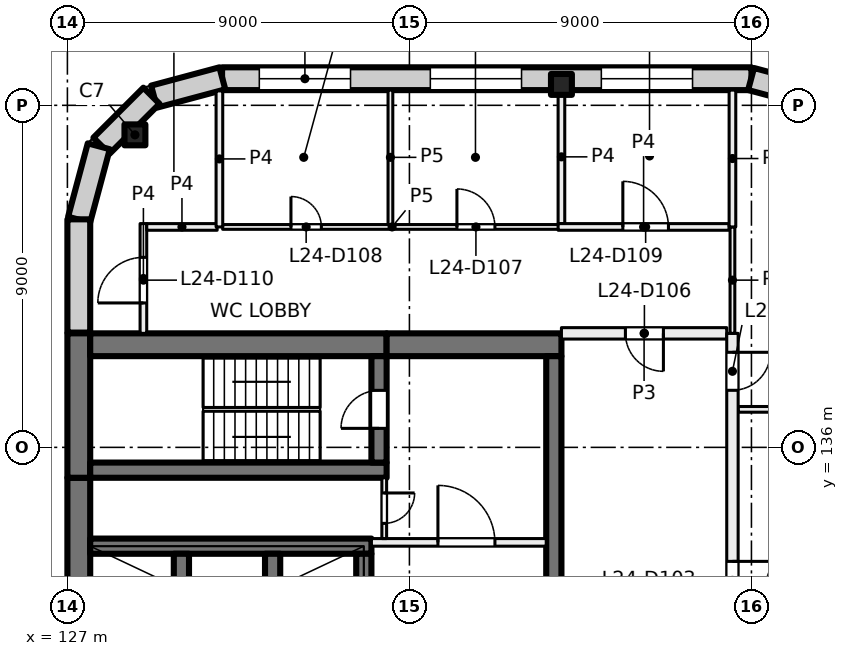
"""IFC4 building model, lengths in metres.
Left out: names, types, materials, properties, quantities, classifications, styles, units other than length and angle.
Written with IfcOpenShell. Run it as: python <this file> out.ifc"""

import sys

from ifc_helpers import new_model, si_unit, direction, frame, frame_2d, origin, origin_2d, place, context, subcontext, project, spatial, rectangle, extrude, element, fill, save


model = new_model("IFC4")
c1 = context("Model", 3, precision=1e-05, world=origin(), true_north=direction((0.0, 1.0)))
c2 = subcontext(c1, "Body", "Model", "MODEL_VIEW")
j1 = project(units=[si_unit("LENGTHUNIT", "METRE"), si_unit("PLANEANGLEUNIT", "RADIAN")], contexts=[c1])
p1 = place(None, origin())
s1 = spatial("IfcSite", under=j1, at=p1, CompositionType="ELEMENT")
p2 = place(p1, origin())
s2 = spatial("IfcBuilding", under=s1, at=p2, CompositionType="ELEMENT")
p3 = place(p2, frame((0.0, 0.0, 105.0)))
s3 = spatial("IfcBuildingStorey", under=s2, at=p3, CompositionType="ELEMENT", Elevation=105.0)
for number, where, z_axis, x_axis in (
    (1, (128.777, 144.223, 0.0), (0.0, 0.0, 1.0), (1.0, 0.0, 0.0)),
    (2, (140.0, 145.55, 0.0), (0.0, 0.0, 1.0), (1.0, 0.0, 0.0)),
):
    element("IfcColumn", number, at=place(p3, frame(where, z_axis=z_axis, x_axis=x_axis)), inside=s3, PredefinedType="COLUMN", context=c2, shape_type="SweptSolid", body=[
        extrude(rectangle(XDim=0.55, YDim=0.55, at=origin_2d()), origin(), (0.0, 0.0, 1.0), 4.0),
    ])
p4 = place(p3, frame((127.3, 120.8, 0.0), z_axis=(0.0, 0.0, 1.0), x_axis=(0.0, 1.0, 0.0)))
e3 = element("IfcWall", 3, at=p4, inside=s3, PredefinedType="SHEAR", context=c2, shape_type="SweptSolid", body=[
    extrude(rectangle(XDim=14.4, YDim=0.6, at=frame_2d((7.2, 0.0))), origin(), (0.0, 0.0, 1.0), 4.0),
])
p5 = place(p3, frame((127.3, 135.2, 0.0), z_axis=(0.0, 0.0, 1.0), x_axis=(0.0, 1.0, 0.0)))
e4 = element("IfcWall", 4, at=p5, inside=s3, PredefinedType="SHEAR", context=c2, shape_type="SweptSolid", body=[
    extrude(rectangle(XDim=3.8, YDim=0.6, at=frame_2d((1.9, 0.0))), origin(), (0.0, 0.0, 1.0), 4.0),
])
p6 = place(p3, frame((127.6, 138.7, 0.0), z_axis=(0.0, 0.0, 1.0), x_axis=(1.0, 0.0, 0.0)))
e5 = element("IfcWall", 5, at=p6, inside=s3, PredefinedType="SHEAR", context=c2, shape_type="SweptSolid", body=[
    extrude(rectangle(XDim=7.8, YDim=0.6, at=frame_2d((3.9, 0.0))), origin(), (0.0, 0.0, 1.0), 4.0),
])
p7 = place(p3, frame((135.4, 138.7, 0.0), z_axis=(0.0, 0.0, 1.0), x_axis=(1.0, 0.0, 0.0)))
e6 = element("IfcWall", 6, at=p7, inside=s3, PredefinedType="SHEAR", context=c2, shape_type="SweptSolid", body=[
    extrude(rectangle(XDim=4.6, YDim=0.6, at=frame_2d((2.3, 0.0))), origin(), (0.0, 0.0, 1.0), 4.0),
])
p8 = place(p3, frame((127.6, 135.4, 0.0), z_axis=(0.0, 0.0, 1.0), x_axis=(1.0, 0.0, 0.0)))
e7 = element("IfcWall", 7, at=p8, inside=s3, PredefinedType="SHEAR", context=c2, shape_type="SweptSolid", body=[
    extrude(rectangle(XDim=7.8, YDim=0.4, at=frame_2d((3.9, 0.0))), origin(), (0.0, 0.0, 1.0), 4.0),
])
p9 = place(p3, frame((135.2, 135.6, 0.0), z_axis=(0.0, 0.0, 1.0), x_axis=(0.0, 1.0, 0.0)))
e8 = element("IfcWall", 8, at=p9, inside=s3, PredefinedType="SHEAR", context=c2, shape_type="SweptSolid", body=[
    extrude(rectangle(XDim=2.8, YDim=0.4, at=frame_2d((1.4, 0.0))), origin(), (0.0, 0.0, 1.0), 4.0),
])
p10 = place(p9, frame((0.9, 0.0, 0.0)))
e9 = element("IfcOpeningElement", 9, at=p10, cuts=e8, PredefinedType="OPENING", context=c2, shape_type="SweptSolid", body=[
    extrude(rectangle(XDim=1.0, YDim=2.1, at=frame_2d((0.5, 1.05))), frame((0.0, 0.21, 0.0), z_axis=(0.0, -1.0, 0.0), x_axis=(1.0, 0.0, 0.0)), (0.0, 0.0, 1.0), 0.42),
])
p11 = place(p3, frame((127.6, 133.4, 0.0), z_axis=(0.0, 0.0, 1.0), x_axis=(1.0, 0.0, 0.0)))
e10 = element("IfcWall", 10, at=p11, inside=s3, PredefinedType="SHEAR", context=c2, shape_type="SweptSolid", body=[
    extrude(rectangle(XDim=7.4, YDim=0.4, at=frame_2d((3.7, 0.0))), origin(), (0.0, 0.0, 1.0), 4.0),
])
for number, where, z_axis, x_axis in (
    (11, (130.0, 130.2, 0.0), (0.0, 0.0, 1.0), (0.0, 1.0, 0.0)),
    (12, (132.4, 130.2, 0.0), (0.0, 0.0, 1.0), (0.0, 1.0, 0.0)),
):
    element("IfcWall", number, at=place(p3, frame(where, z_axis=z_axis, x_axis=x_axis)), inside=s3, PredefinedType="SHEAR", context=c2, shape_type="SweptSolid", body=[
        extrude(rectangle(XDim=3.0, YDim=0.4, at=frame_2d((1.5, 0.0))), origin(), (0.0, 0.0, 1.0), 4.0),
    ])
p12 = place(p3, frame((134.8, 130.2, 0.0), z_axis=(0.0, 0.0, 1.0), x_axis=(0.0, 1.0, 0.0)))
e13 = element("IfcWall", 13, at=p12, inside=s3, PredefinedType="SHEAR", context=c2, shape_type="SweptSolid", body=[
    extrude(rectangle(XDim=3.0, YDim=0.4, at=frame_2d((1.5, 0.0))), origin(), (0.0, 0.0, 1.0), 4.0),
])
p13 = place(p12, frame((0.95, 0.0, 0.0)))
e14 = element("IfcOpeningElement", 14, at=p13, cuts=e13, PredefinedType="OPENING", context=c2, shape_type="SweptSolid", body=[
    extrude(rectangle(XDim=1.1, YDim=2.1, at=frame_2d((0.55, 1.05))), frame((0.0, 0.21, 0.0), z_axis=(0.0, -1.0, 0.0), x_axis=(1.0, 0.0, 0.0)), (0.0, 0.0, 1.0), 0.42),
])
p14 = place(p3, frame((139.8, 129.8, 0.0), z_axis=(0.0, 0.0, 1.0), x_axis=(0.0, 1.0, 0.0)))
e15 = element("IfcWall", 15, at=p14, inside=s3, PredefinedType="SHEAR", context=c2, shape_type="SweptSolid", body=[
    extrude(rectangle(XDim=8.6, YDim=0.4, at=frame_2d((4.3, 0.0))), origin(), (0.0, 0.0, 1.0), 4.0),
])
p15 = place(p3, frame((131.07, 145.7, 0.0), z_axis=(0.0, 0.0, 1.0), x_axis=(1.0, 0.0, 0.0)))
e16 = element("IfcWall", 16, at=p15, inside=s3, PredefinedType="SOLIDWALL", context=c2, shape_type="SweptSolid", body=[
    extrude(rectangle(XDim=13.93, YDim=0.6, at=frame_2d((6.965, 0.0))), origin(), (0.0, 0.0, 1.0), 3.625),
])
p16 = place(p15, frame((0.98, 0.0, 0.9)))
e17 = element("IfcOpeningElement", 17, at=p16, cuts=e16, PredefinedType="OPENING", context=c2, shape_type="SweptSolid", body=[
    extrude(rectangle(XDim=2.4, YDim=2.4, at=frame_2d((1.2, 1.2))), frame((0.0, 0.31, 0.0), z_axis=(0.0, -1.0, 0.0), x_axis=(1.0, 0.0, 0.0)), (0.0, 0.0, 1.0), 0.62),
])
p17 = place(p15, frame((5.48, 0.0, 0.9)))
e18 = element("IfcOpeningElement", 18, at=p17, cuts=e16, PredefinedType="OPENING", context=c2, shape_type="SweptSolid", body=[
    extrude(rectangle(XDim=2.4, YDim=2.4, at=frame_2d((1.2, 1.2))), frame((0.0, 0.31, 0.0), z_axis=(0.0, -1.0, 0.0), x_axis=(1.0, 0.0, 0.0)), (0.0, 0.0, 1.0), 0.62),
])
p18 = place(p15, frame((9.98, 0.0, 0.9)))
e19 = element("IfcOpeningElement", 19, at=p18, cuts=e16, PredefinedType="OPENING", context=c2, shape_type="SweptSolid", body=[
    extrude(rectangle(XDim=2.4, YDim=2.4, at=frame_2d((1.2, 1.2))), frame((0.0, 0.31, 0.0), z_axis=(0.0, -1.0, 0.0), x_axis=(1.0, 0.0, 0.0)), (0.0, 0.0, 1.0), 0.62),
])
for number, where, z_axis, x_axis in (
    (20, (129.281, 145.229, 0.0), (0.0, 0.0, 1.0), (0.966, 0.259, 0.0)),
    (21, (127.896, 143.936, 0.0), (0.0, 0.0, 1.0), (0.707, 0.707, 0.0)),
):
    element("IfcWall", number, at=place(p3, frame(where, z_axis=z_axis, x_axis=x_axis)), inside=s3, PredefinedType="SOLIDWALL", context=c2, shape_type="SweptSolid", body=[
        extrude(rectangle(XDim=1.861, YDim=0.6, at=frame_2d((0.93, 0.0))), origin(), (0.0, 0.0, 1.0), 3.625),
    ])
p19 = place(p3, frame((127.308, 141.99, 0.0), z_axis=(0.0, 0.0, 1.0), x_axis=(0.258839784042, 0.965920269068, 0.0)))
e22 = element("IfcWall", 22, at=p19, inside=s3, PredefinedType="SOLIDWALL", context=c2, shape_type="SweptSolid", body=[
    extrude(rectangle(XDim=2.0, YDim=0.6, at=frame_2d((1.0, 0.0))), origin(), (0.0, 0.0, 1.0), 3.625),
])
p20 = place(p3, frame((127.3, 139.02, 0.0), z_axis=(0.0, 0.0, 1.0), x_axis=(0.0, 1.0, 0.0)))
e23 = element("IfcWall", 23, at=p20, inside=s3, PredefinedType="SOLIDWALL", context=c2, shape_type="SweptSolid", body=[
    extrude(rectangle(XDim=2.98, YDim=0.6, at=frame_2d((1.49, 0.0))), origin(), (0.0, 0.0, 1.0), 3.625),
])
p21 = place(p3, frame((144.99, 145.692, 0.0), z_axis=(0.0, 0.0, 1.0), x_axis=(0.965920269068, -0.258839784042, 0.0)))
e24 = element("IfcWall", 24, at=p21, inside=s3, PredefinedType="SOLIDWALL", context=c2, shape_type="SweptSolid", body=[
    extrude(rectangle(XDim=2.0, YDim=0.6, at=frame_2d((1.0, 0.0))), origin(), (0.0, 0.0, 1.0), 3.625),
])
p22 = place(p3, frame((135.0, 133.5, 0.0), z_axis=(0.0, 0.0, 1.0), x_axis=(1.0, 0.0, 0.0)))
e25 = element("IfcWall", 25, at=p22, inside=s3, PredefinedType="PARTITIONING", context=c2, shape_type="SweptSolid", body=[
    extrude(rectangle(XDim=4.6, YDim=0.2, at=frame_2d((2.3, 0.0))), origin(), (0.0, 0.0, 1.0), 3.625),
])
p23 = place(p22, frame((1.75, 0.0, 0.0)))
e26 = element("IfcOpeningElement", 26, at=p23, cuts=e25, PredefinedType="OPENING", context=c2, shape_type="SweptSolid", body=[
    extrude(rectangle(XDim=1.5, YDim=2.1, at=frame_2d((0.75, 1.05))), frame((0.0, 0.11, 0.0), z_axis=(0.0, -1.0, 0.0), x_axis=(1.0, 0.0, 0.0)), (0.0, 0.0, 1.0), 0.22),
])
p24 = place(p3, frame((135.337, 135.2, 0.0), z_axis=(0.0, 0.0, 1.0), x_axis=(0.0, -1.0, 0.0)))
e27 = element("IfcWall", 27, at=p24, inside=s3, PredefinedType="PARTITIONING", context=c2, shape_type="SweptSolid", body=[
    extrude(rectangle(XDim=1.6, YDim=0.125, at=frame_2d((0.8, 0.0))), origin(), (0.0, 0.0, 1.0), 3.625),
])
p25 = place(p24, frame((0.4, 0.0, 0.0)))
e28 = element("IfcOpeningElement", 28, at=p25, cuts=e27, PredefinedType="OPENING", context=c2, shape_type="SweptSolid", body=[
    extrude(rectangle(XDim=0.8, YDim=2.1, at=frame_2d((0.4, 1.05))), frame((0.0, 0.073, 0.0), z_axis=(0.0, -1.0, 0.0), x_axis=(1.0, 0.0, 0.0)), (0.0, 0.0, 1.0), 0.145),
])
p26 = place(p3, frame((129.0, 139.0, 0.0), z_axis=(0.0, 0.0, 1.0), x_axis=(0.0, 1.0, 0.0)))
e29 = element("IfcWall", 29, at=p26, inside=s3, PredefinedType="PARTITIONING", context=c2, shape_type="SweptSolid", body=[
    extrude(rectangle(XDim=2.888, YDim=0.175, at=frame_2d((1.444, 0.0))), origin(), (0.0, 0.0, 1.0), 3.625),
])
p27 = place(p26, frame((0.8, 0.0, 0.0)))
e30 = element("IfcOpeningElement", 30, at=p27, cuts=e29, PredefinedType="OPENING", context=c2, shape_type="SweptSolid", body=[
    extrude(rectangle(XDim=1.2, YDim=2.1, at=frame_2d((0.6, 1.05))), frame((0.0, 0.097, 0.0), z_axis=(0.0, -1.0, 0.0), x_axis=(1.0, 0.0, 0.0)), (0.0, 0.0, 1.0), 0.195),
])
p28 = place(p3, frame((129.088, 141.8, 0.0), z_axis=(0.0, 0.0, 1.0), x_axis=(1.0, 0.0, 0.0)))
e31 = element("IfcWall", 31, at=p28, inside=s3, PredefinedType="PARTITIONING", context=c2, shape_type="SweptSolid", body=[
    extrude(rectangle(XDim=1.853, YDim=0.175, at=frame_2d((0.927, 0.0))), origin(), (0.0, 0.0, 1.0), 3.625),
])
p29 = place(p3, frame((131.085, 141.8, 0.0), z_axis=(0.0, 0.0, 1.0), x_axis=(1.0, 0.0, 0.0)))
e32 = element("IfcWall", 32, at=p29, inside=s3, PredefinedType="PARTITIONING", context=c2, shape_type="SweptSolid", body=[
    extrude(rectangle(XDim=8.918, YDim=0.125, at=frame_2d((4.459, 0.0))), origin(), (0.0, 0.0, 1.0), 3.625),
])
p30 = place(p29, frame((6.165, 0.0, 0.0)))
e33 = element("IfcOpeningElement", 33, at=p30, cuts=e32, PredefinedType="OPENING", context=c2, shape_type="SweptSolid", body=[
    extrude(rectangle(XDim=1.0, YDim=2.1, at=frame_2d((0.5, 1.05))), frame((0.0, 0.073, 0.0), z_axis=(0.0, -1.0, 0.0), x_axis=(1.0, 0.0, 0.0)), (0.0, 0.0, 1.0), 0.145),
])
p31 = place(p29, frame((1.798, 0.0, 0.0)))
e34 = element("IfcOpeningElement", 34, at=p31, cuts=e32, PredefinedType="OPENING", context=c2, shape_type="SweptSolid", body=[
    extrude(rectangle(XDim=0.8, YDim=2.1, at=frame_2d((0.4, 1.05))), frame((0.0, 0.073, 0.0), z_axis=(0.0, -1.0, 0.0), x_axis=(1.0, 0.0, 0.0)), (0.0, 0.0, 1.0), 0.145),
])
p32 = place(p3, frame((131.0, 145.379, 0.0), z_axis=(0.0, 0.0, 1.0), x_axis=(0.0, -1.0, 0.0)))
e35 = element("IfcWall", 35, at=p32, inside=s3, PredefinedType="PARTITIONING", context=c2, shape_type="SweptSolid", body=[
    extrude(rectangle(XDim=3.579, YDim=0.175, at=frame_2d((1.79, 0.0))), origin(), (0.0, 0.0, 1.0), 3.625),
])
p33 = place(p3, frame((135.5, 141.862, 0.0), z_axis=(0.0, 0.0, 1.0), x_axis=(0.0, 1.0, 0.0)))
e36 = element("IfcWall", 36, at=p33, inside=s3, PredefinedType="PARTITIONING", context=c2, shape_type="SweptSolid", body=[
    extrude(rectangle(XDim=3.538, YDim=0.125, at=frame_2d((1.769, 0.0))), origin(), (0.0, 0.0, 1.0), 3.625),
])
p34 = place(p3, frame((144.35, 139.0, 0.0), z_axis=(0.0, 0.0, 1.0), x_axis=(-1.0, 0.0, 0.0)))
e37 = element("IfcWall", 37, at=p34, inside=s3, PredefinedType="PARTITIONING", context=c2, shape_type="SweptSolid", body=[
    extrude(rectangle(XDim=4.35, YDim=0.3, at=frame_2d((2.175, 0.0))), origin(), (0.0, 0.0, 1.0), 3.625),
])
p35 = place(p34, frame((1.667, 0.0, 0.0)))
e38 = element("IfcOpeningElement", 38, at=p35, cuts=e37, PredefinedType="OPENING", context=c2, shape_type="SweptSolid", body=[
    extrude(rectangle(XDim=1.0, YDim=2.1, at=frame_2d((0.5, 1.05))), frame((0.0, 0.16, 0.0), z_axis=(0.0, -1.0, 0.0), x_axis=(1.0, 0.0, 0.0)), (0.0, 0.0, 1.0), 0.32),
])
p36 = place(p3, frame((140.0, 141.888, 0.0), z_axis=(0.0, 0.0, 1.0), x_axis=(0.0, 1.0, 0.0)))
e39 = element("IfcWall", 39, at=p36, inside=s3, PredefinedType="PARTITIONING", context=c2, shape_type="SweptSolid", body=[
    extrude(rectangle(XDim=3.512, YDim=0.175, at=frame_2d((1.756, 0.0))), origin(), (0.0, 0.0, 1.0), 3.625),
])
p37 = place(p3, frame((139.912, 141.8, 0.0), z_axis=(0.0, 0.0, 1.0), x_axis=(1.0, 0.0, 0.0)))
e40 = element("IfcWall", 40, at=p37, inside=s3, PredefinedType="PARTITIONING", context=c2, shape_type="SweptSolid", body=[
    extrude(rectangle(XDim=4.5, YDim=0.175, at=frame_2d((2.25, 0.0))), origin(), (0.0, 0.0, 1.0), 3.625),
])
p38 = place(p37, frame((1.704, 0.0, 0.0)))
e41 = element("IfcOpeningElement", 41, at=p38, cuts=e40, PredefinedType="OPENING", context=c2, shape_type="SweptSolid", body=[
    extrude(rectangle(XDim=1.2, YDim=2.1, at=frame_2d((0.6, 1.05))), frame((0.0, 0.097, 0.0), z_axis=(0.0, -1.0, 0.0), x_axis=(1.0, 0.0, 0.0)), (0.0, 0.0, 1.0), 0.195),
])
p39 = place(p3, frame((144.65, 137.0, 0.0), z_axis=(0.0, 0.0, 1.0), x_axis=(1.0, 0.0, 0.0)))
e42 = element("IfcWall", 42, at=p39, inside=s3, PredefinedType="PARTITIONING", context=c2, shape_type="SweptSolid", body=[
    extrude(rectangle(XDim=3.75, YDim=0.15, at=frame_2d((1.875, 0.0))), origin(), (0.0, 0.0, 1.0), 3.625),
])
p40 = place(p3, frame((144.5, 139.0, 0.0), z_axis=(0.0, 0.0, 1.0), x_axis=(0.0, -1.0, 0.0)))
e43 = element("IfcWall", 43, at=p40, inside=s3, PredefinedType="PARTITIONING", context=c2, shape_type="SweptSolid", body=[
    extrude(rectangle(XDim=22.0, YDim=0.3, at=frame_2d((11.0, 0.0))), origin(), (0.0, 0.0, 1.0), 3.625),
])
p41 = place(p40, frame((20.501, 0.0, 0.0)))
e44 = element("IfcOpeningElement", 44, at=p41, cuts=e43, PredefinedType="OPENING", context=c2, shape_type="SweptSolid", body=[
    extrude(rectangle(XDim=1.0, YDim=2.1, at=frame_2d((0.5, 1.05))), frame((0.0, 0.16, 0.0), z_axis=(0.0, -1.0, 0.0), x_axis=(1.0, 0.0, 0.0)), (0.0, 0.0, 1.0), 0.32),
])
p42 = place(p40, frame((15.0, 0.0, 0.0)))
e45 = element("IfcOpeningElement", 45, at=p42, cuts=e43, PredefinedType="OPENING", context=c2, shape_type="SweptSolid", body=[
    extrude(rectangle(XDim=1.0, YDim=2.1, at=frame_2d((0.5, 1.05))), frame((0.0, 0.16, 0.0), z_axis=(0.0, -1.0, 0.0), x_axis=(1.0, 0.0, 0.0)), (0.0, 0.0, 1.0), 0.32),
])
p43 = place(p40, frame((6.0, 0.0, 0.0)))
e46 = element("IfcOpeningElement", 46, at=p43, cuts=e43, PredefinedType="OPENING", context=c2, shape_type="SweptSolid", body=[
    extrude(rectangle(XDim=1.0, YDim=2.1, at=frame_2d((0.5, 1.05))), frame((0.0, 0.16, 0.0), z_axis=(0.0, -1.0, 0.0), x_axis=(1.0, 0.0, 0.0)), (0.0, 0.0, 1.0), 0.32),
])
p44 = place(p40, frame((0.499, 0.0, 0.0)))
e47 = element("IfcOpeningElement", 47, at=p44, cuts=e43, PredefinedType="OPENING", context=c2, shape_type="SweptSolid", body=[
    extrude(rectangle(XDim=1.0, YDim=2.1, at=frame_2d((0.5, 1.05))), frame((0.0, 0.16, 0.0), z_axis=(0.0, -1.0, 0.0), x_axis=(1.0, 0.0, 0.0)), (0.0, 0.0, 1.0), 0.32),
])
p45 = place(p3, frame((144.5, 141.8, 0.0), z_axis=(0.0, 0.0, 1.0), x_axis=(0.0, -1.0, 0.0)))
e48 = element("IfcWall", 48, at=p45, inside=s3, PredefinedType="PARTITIONING", context=c2, shape_type="SweptSolid", body=[
    extrude(rectangle(XDim=2.8, YDim=0.125, at=frame_2d((1.4, 0.0))), origin(), (0.0, 0.0, 1.0), 3.625),
])
p46 = place(p3, frame((144.5, 141.8, 0.0), z_axis=(0.0, 0.0, 1.0), x_axis=(0.0, 1.0, 0.0)))
e49 = element("IfcWall", 49, at=p46, inside=s3, PredefinedType="PARTITIONING", context=c2, shape_type="SweptSolid", body=[
    extrude(rectangle(XDim=3.6, YDim=0.175, at=frame_2d((1.8, 0.0))), origin(), (0.0, 0.0, 1.0), 3.625),
])
p47 = place(p16, origin())
e50 = element("IfcWindow", 50, at=p47, inside=s3, PartitioningType="SINGLE_PANEL", PredefinedType="WINDOW", context=c2, shape_type="SweptSolid", body=[
    extrude(rectangle(XDim=2.4, YDim=2.4, at=frame_2d((1.2, 1.2))), frame((0.0, 0.03, 0.0), z_axis=(0.0, -1.0, 0.0), x_axis=(1.0, 0.0, 0.0)), (0.0, 0.0, 1.0), 0.06),
])
fill(e17, e50)
p48 = place(p17, origin())
e51 = element("IfcWindow", 51, at=p48, inside=s3, PartitioningType="SINGLE_PANEL", PredefinedType="WINDOW", context=c2, shape_type="SweptSolid", body=[
    extrude(rectangle(XDim=2.4, YDim=2.4, at=frame_2d((1.2, 1.2))), frame((0.0, 0.03, 0.0), z_axis=(0.0, -1.0, 0.0), x_axis=(1.0, 0.0, 0.0)), (0.0, 0.0, 1.0), 0.06),
])
fill(e18, e51)
p49 = place(p18, origin())
e52 = element("IfcWindow", 52, at=p49, inside=s3, PartitioningType="SINGLE_PANEL", PredefinedType="WINDOW", context=c2, shape_type="SweptSolid", body=[
    extrude(rectangle(XDim=2.4, YDim=2.4, at=frame_2d((1.2, 1.2))), frame((0.0, 0.03, 0.0), z_axis=(0.0, -1.0, 0.0), x_axis=(1.0, 0.0, 0.0)), (0.0, 0.0, 1.0), 0.06),
])
fill(e19, e52)
p50 = place(p23, origin())
e53 = element("IfcDoor", 53, at=p50, inside=s3, OperationType="DOUBLE_DOOR_SINGLE_SWING", PredefinedType="DOOR", context=c2, shape_type="SweptSolid", body=[
    extrude(rectangle(XDim=1.5, YDim=2.1, at=frame_2d((0.75, 1.05))), frame((0.0, 0.025, 0.0), z_axis=(0.0, -1.0, 0.0), x_axis=(1.0, 0.0, 0.0)), (0.0, 0.0, 1.0), 0.05),
])
fill(e26, e53)
p51 = place(p10, origin())
e54 = element("IfcDoor", 54, at=p51, inside=s3, OperationType="SINGLE_SWING_LEFT", PredefinedType="DOOR", context=c2, shape_type="SweptSolid", body=[
    extrude(rectangle(XDim=1.0, YDim=2.1, at=frame_2d((0.5, 1.05))), frame((0.0, 0.025, 0.0), z_axis=(0.0, -1.0, 0.0), x_axis=(1.0, 0.0, 0.0)), (0.0, 0.0, 1.0), 0.05),
])
fill(e9, e54)
p52 = place(p25, origin())
e55 = element("IfcDoor", 55, at=p52, inside=s3, OperationType="SINGLE_SWING_RIGHT", PredefinedType="DOOR", context=c2, shape_type="SweptSolid", body=[
    extrude(rectangle(XDim=0.8, YDim=2.1, at=frame_2d((0.4, 1.05))), frame((0.0, 0.025, 0.0), z_axis=(0.0, -1.0, 0.0), x_axis=(1.0, 0.0, 0.0)), (0.0, 0.0, 1.0), 0.05),
])
fill(e28, e55)
p53 = place(p43, origin())
e56 = element("IfcDoor", 56, at=p53, inside=s3, OperationType="SINGLE_SWING_LEFT", PredefinedType="DOOR", context=c2, shape_type="SweptSolid", body=[
    extrude(rectangle(XDim=1.0, YDim=2.1, at=frame_2d((0.5, 1.05))), frame((0.0, 0.025, 0.0), z_axis=(0.0, -1.0, 0.0), x_axis=(1.0, 0.0, 0.0)), (0.0, 0.0, 1.0), 0.05),
])
fill(e46, e56)
p54 = place(p44, origin())
e57 = element("IfcDoor", 57, at=p54, inside=s3, OperationType="SINGLE_SWING_LEFT", PredefinedType="DOOR", context=c2, shape_type="SweptSolid", body=[
    extrude(rectangle(XDim=1.0, YDim=2.1, at=frame_2d((0.5, 1.05))), frame((0.0, 0.025, 0.0), z_axis=(0.0, -1.0, 0.0), x_axis=(1.0, 0.0, 0.0)), (0.0, 0.0, 1.0), 0.05),
])
fill(e47, e57)
p55 = place(p35, origin())
e58 = element("IfcDoor", 58, at=p55, inside=s3, OperationType="SINGLE_SWING_LEFT", PredefinedType="DOOR", context=c2, shape_type="SweptSolid", body=[
    extrude(rectangle(XDim=1.0, YDim=2.1, at=frame_2d((0.5, 1.05))), frame((0.0, 0.025, 0.0), z_axis=(0.0, -1.0, 0.0), x_axis=(1.0, 0.0, 0.0)), (0.0, 0.0, 1.0), 0.05),
])
fill(e38, e58)
p56 = place(p30, origin())
e59 = element("IfcDoor", 59, at=p56, inside=s3, OperationType="SINGLE_SWING_RIGHT", PredefinedType="DOOR", context=c2, shape_type="SweptSolid", body=[
    extrude(rectangle(XDim=1.0, YDim=2.1, at=frame_2d((0.5, 1.05))), frame((0.0, 0.025, 0.0), z_axis=(0.0, -1.0, 0.0), x_axis=(1.0, 0.0, 0.0)), (0.0, 0.0, 1.0), 0.05),
])
fill(e33, e59)
p57 = place(p31, origin())
e60 = element("IfcDoor", 60, at=p57, inside=s3, OperationType="SINGLE_SWING_LEFT", PredefinedType="DOOR", context=c2, shape_type="SweptSolid", body=[
    extrude(rectangle(XDim=0.8, YDim=2.1, at=frame_2d((0.4, 1.05))), frame((0.0, 0.025, 0.0), z_axis=(0.0, -1.0, 0.0), x_axis=(1.0, 0.0, 0.0)), (0.0, 0.0, 1.0), 0.05),
])
fill(e34, e60)
p58 = place(p38, origin())
e61 = element("IfcDoor", 61, at=p58, inside=s3, OperationType="DOUBLE_DOOR_SINGLE_SWING", PredefinedType="DOOR", context=c2, shape_type="SweptSolid", body=[
    extrude(rectangle(XDim=1.2, YDim=2.1, at=frame_2d((0.6, 1.05))), frame((0.0, 0.025, 0.0), z_axis=(0.0, -1.0, 0.0), x_axis=(1.0, 0.0, 0.0)), (0.0, 0.0, 1.0), 0.05),
])
fill(e41, e61)
p59 = place(p27, origin())
e62 = element("IfcDoor", 62, at=p59, inside=s3, OperationType="DOUBLE_DOOR_SINGLE_SWING", PredefinedType="DOOR", context=c2, shape_type="SweptSolid", body=[
    extrude(rectangle(XDim=1.2, YDim=2.1, at=frame_2d((0.6, 1.05))), frame((0.0, 0.025, 0.0), z_axis=(0.0, -1.0, 0.0), x_axis=(1.0, 0.0, 0.0)), (0.0, 0.0, 1.0), 0.05),
])
fill(e30, e62)
save(model, sys.argv[1])
